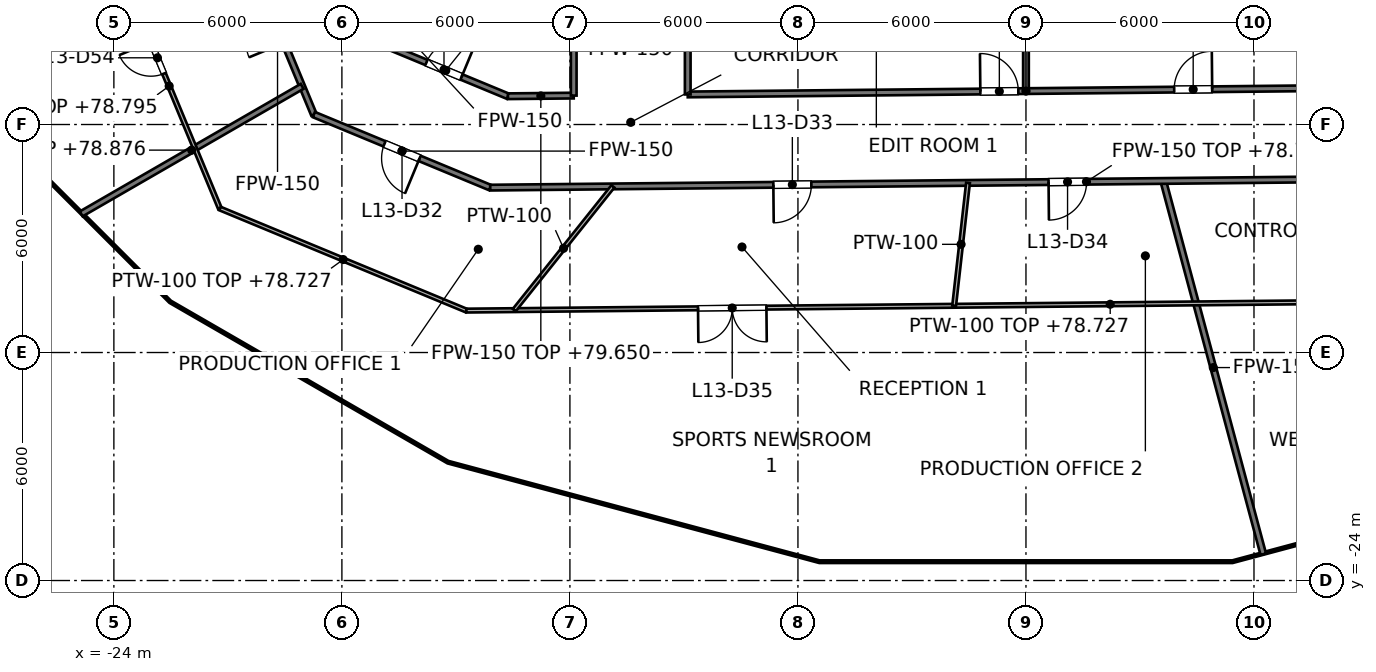
"""IFC4 building model, lengths in metres.
Left out: names, types, materials, properties, quantities, classifications, styles, units other than length and angle.
Written with IfcOpenShell. Run it as: python <this file> out.ifc"""

import sys

from ifc_helpers import new_model, si_unit, direction, frame, frame_2d, origin, place, context, subcontext, project, spatial, rectangle, extrude, element, fill, save


model = new_model("IFC4")
c1 = context("Model", 3, precision=1e-05, world=origin(), true_north=direction((0.0, 1.0)))
c2 = subcontext(c1, "Body", "Model", "MODEL_VIEW")
j1 = project(units=[si_unit("LENGTHUNIT", "METRE"), si_unit("PLANEANGLEUNIT", "RADIAN")], contexts=[c1])
p1 = place(None, origin())
s1 = spatial("IfcSite", under=j1, at=p1, CompositionType="ELEMENT")
p2 = place(p1, origin())
s2 = spatial("IfcBuilding", under=s1, at=p2, CompositionType="ELEMENT")
p3 = place(p2, frame((0.0, 0.0, 75.6)))
s3 = spatial("IfcBuildingStorey", under=s2, at=p3, CompositionType="ELEMENT", Elevation=75.6)
p4 = place(p3, frame((3.613, -13.485, 0.0), z_axis=(0.0, 0.0, 1.0), x_axis=(0.258799691225, -0.965931011937, 0.0)))
e1 = element("IfcWall", 1, at=p4, inside=s3, PredefinedType="PARTITIONING", context=c2, shape_type="SweptSolid", body=[
    extrude(rectangle(XDim=10.168, YDim=0.15, at=frame_2d((5.084, 0.0))), origin(), (0.0, 0.0, 1.0), 3.502),
])
p5 = place(p3, frame((-20.65, -7.124, 0.0), z_axis=(0.0, 0.0, 1.0), x_axis=(0.382941772901, -0.923772482036, 0.0)))
e2 = element("IfcWall", 2, at=p5, inside=s3, PredefinedType="PARTITIONING", context=c2, shape_type="SweptSolid", body=[
    extrude(rectangle(XDim=4.994, YDim=0.15, at=frame_2d((2.497, 0.0))), origin(), (0.0, 0.0, 1.0), 3.195),
])
p6 = place(p5, frame((1.95, 0.0, 0.0)))
e3 = element("IfcOpeningElement", 3, at=p6, cuts=e2, PredefinedType="OPENING", context=c2, shape_type="SweptSolid", body=[
    extrude(rectangle(XDim=1.0, YDim=2.1, at=frame_2d((0.5, 1.05))), frame((0.0, 0.075, 0.0), z_axis=(0.0, -1.0, 0.0), x_axis=(1.0, 0.0, 0.0)), (0.0, 0.0, 1.0), 0.15),
])
p7 = place(p3, frame((-18.738, -11.738, 0.0), z_axis=(0.0, 0.0, 1.0), x_axis=(0.923848598814, -0.38275810438, 0.0)))
e4 = element("IfcWall", 4, at=p7, inside=s3, PredefinedType="PARTITIONING", context=c2, shape_type="SweptSolid", body=[
    extrude(rectangle(XDim=5.024, YDim=0.15, at=frame_2d((2.512, 0.0))), origin(), (0.0, 0.0, 1.0), 3.195),
])
p8 = place(p7, frame((2.012, 0.0, 0.0)))
e5 = element("IfcOpeningElement", 5, at=p8, cuts=e4, PredefinedType="OPENING", context=c2, shape_type="SweptSolid", body=[
    extrude(rectangle(XDim=1.0, YDim=2.1, at=frame_2d((0.5, 1.05))), frame((0.0, 0.075, 0.0), z_axis=(0.0, -1.0, 0.0), x_axis=(1.0, 0.0, 0.0)), (0.0, 0.0, 1.0), 0.15),
])
p9 = place(p3, frame((-16.901, -9.901, 0.0), z_axis=(0.0, 0.0, 1.0), x_axis=(0.923795674736, -0.382885820239, 0.0)))
e6 = element("IfcWall", 6, at=p9, inside=s3, PredefinedType="PARTITIONING", context=c2, shape_type="SweptSolid", body=[
    extrude(rectangle(XDim=3.54, YDim=0.15, at=frame_2d((1.77, 0.0))), origin(), (0.0, 0.0, 1.0), 3.195),
])
p10 = place(p9, frame((1.219, 0.0, 0.0)))
e7 = element("IfcOpeningElement", 7, at=p10, cuts=e6, PredefinedType="OPENING", context=c2, shape_type="SweptSolid", body=[
    extrude(rectangle(XDim=1.0, YDim=2.1, at=frame_2d((0.5, 1.05))), frame((0.0, 0.075, 0.0), z_axis=(0.0, -1.0, 0.0), x_axis=(1.0, 0.0, 0.0)), (0.0, 0.0, 1.0), 0.15),
])
p11 = place(p3, frame((-14.097, -13.661, 0.0), z_axis=(0.0, 0.0, 1.0), x_axis=(0.999950951425, 0.009904279054, 0.0)))
e8 = element("IfcWall", 8, at=p11, inside=s3, PredefinedType="PARTITIONING", context=c2, shape_type="SweptSolid", body=[
    extrude(rectangle(XDim=31.379, YDim=0.15, at=frame_2d((15.69, 0.0))), origin(), (0.0, 0.0, 1.0), 3.127),
])
p12 = place(p11, frame((7.45, 0.0, 0.0)))
e9 = element("IfcOpeningElement", 9, at=p12, cuts=e8, PredefinedType="OPENING", context=c2, shape_type="SweptSolid", body=[
    extrude(rectangle(XDim=1.0, YDim=2.1, at=frame_2d((0.5, 1.05))), frame((0.0, 0.075, 0.0), z_axis=(0.0, -1.0, 0.0), x_axis=(1.0, 0.0, 0.0)), (0.0, 0.0, 1.0), 0.15),
])
p13 = place(p11, frame((14.692, 0.0, 0.0)))
e10 = element("IfcOpeningElement", 10, at=p13, cuts=e8, PredefinedType="OPENING", context=c2, shape_type="SweptSolid", body=[
    extrude(rectangle(XDim=1.0, YDim=2.1, at=frame_2d((0.5, 1.05))), frame((0.0, 0.075, 0.0), z_axis=(0.0, -1.0, 0.0), x_axis=(1.0, 0.0, 0.0)), (0.0, 0.0, 1.0), 0.15),
])
p14 = place(p11, frame((24.046, 0.0, 0.0)))
e11 = element("IfcOpeningElement", 11, at=p14, cuts=e8, PredefinedType="OPENING", context=c2, shape_type="SweptSolid", body=[
    extrude(rectangle(XDim=1.0, YDim=2.1, at=frame_2d((0.5, 1.05))), frame((0.0, 0.075, 0.0), z_axis=(0.0, -1.0, 0.0), x_axis=(1.0, 0.0, 0.0)), (0.0, 0.0, 1.0), 0.15),
])
p15 = place(p3, frame((-13.631, -11.256, 0.0), z_axis=(0.0, 0.0, 1.0), x_axis=(0.999949876767, 0.010012190276, 0.0)))
e12 = element("IfcWall", 12, at=p15, inside=s3, PredefinedType="PARTITIONING", context=c2, shape_type="SweptSolid", body=[
    extrude(rectangle(XDim=1.731, YDim=0.15, at=frame_2d((0.866, 0.0))), origin(), (0.0, 0.0, 1.0), 4.05),
])
p16 = place(p3, frame((-8.9, -11.209, 0.0), z_axis=(0.0, 0.0, 1.0), x_axis=(0.999950969978, 0.009902405776, 0.0)))
e13 = element("IfcWall", 13, at=p16, inside=s3, PredefinedType="PARTITIONING", context=c2, shape_type="SweptSolid", body=[
    extrude(rectangle(XDim=17.801, YDim=0.15, at=frame_2d((8.9, 0.0))), origin(), (0.0, 0.0, 1.0), 3.127),
])
p17 = place(p16, frame((7.7, 0.0, 0.0)))
e14 = element("IfcOpeningElement", 14, at=p17, cuts=e13, PredefinedType="OPENING", context=c2, shape_type="SweptSolid", body=[
    extrude(rectangle(XDim=1.0, YDim=2.1, at=frame_2d((0.5, 1.05))), frame((0.0, 0.075, 0.0), z_axis=(0.0, -1.0, 0.0), x_axis=(1.0, 0.0, 0.0)), (0.0, 0.0, 1.0), 0.15),
])
p18 = place(p16, frame((12.801, 0.0, 0.0)))
e15 = element("IfcOpeningElement", 15, at=p18, cuts=e13, PredefinedType="OPENING", context=c2, shape_type="SweptSolid", body=[
    extrude(rectangle(XDim=1.0, YDim=2.1, at=frame_2d((0.5, 1.05))), frame((0.0, 0.075, 0.0), z_axis=(0.0, -1.0, 0.0), x_axis=(1.0, 0.0, 0.0)), (0.0, 0.0, 1.0), 0.15),
])
p19 = place(p3, frame((-24.859, -14.352, 0.0), z_axis=(0.0, 0.0, 1.0), x_axis=(0.866036584562, 0.499980633826, 0.0)))
e16 = element("IfcWall", 16, at=p19, inside=s3, PredefinedType="PARTITIONING", context=c2, shape_type="SweptSolid", body=[
    extrude(rectangle(XDim=6.712, YDim=0.15, at=frame_2d((3.356, 0.0))), origin(), (0.0, 0.0, 1.0), 3.276),
])
p20 = place(p3, frame((0.0, -11.12, 0.0), z_axis=(0.0, 0.0, 1.0), x_axis=(0.0, 1.0, 0.0)))
e17 = element("IfcWall", 17, at=p20, inside=s3, PredefinedType="PARTITIONING", context=c2, shape_type="SweptSolid", body=[
    extrude(rectangle(XDim=3.12, YDim=0.15, at=frame_2d((1.56, 0.0))), origin(), (0.0, 0.0, 1.0), 3.127),
])
p21 = place(p3, frame((-8.9, -11.209, 0.0), z_axis=(0.0, 0.0, 1.0), x_axis=(0.0, 1.0, 0.0)))
e18 = element("IfcWall", 18, at=p21, inside=s3, PredefinedType="PARTITIONING", context=c2, shape_type="SweptSolid", body=[
    extrude(rectangle(XDim=3.209, YDim=0.15, at=frame_2d((1.604, 0.0))), origin(), (0.0, 0.0, 1.0), 3.127),
])
p22 = place(p3, frame((-11.9, -11.239, 0.0), z_axis=(0.0, 0.0, 1.0), x_axis=(0.0, 1.0, 0.0)))
e19 = element("IfcWall", 19, at=p22, inside=s3, PredefinedType="PARTITIONING", context=c2, shape_type="SweptSolid", body=[
    extrude(rectangle(XDim=3.239, YDim=0.15, at=frame_2d((1.62, 0.0))), origin(), (0.0, 0.0, 1.0), 3.195),
])
p23 = place(p3, frame((-23.88, -7.767, 0.0), z_axis=(0.0, 0.0, 1.0), x_axis=(0.382859836194, -0.923806443921, 0.0)))
e20 = element("IfcWall", 20, at=p23, inside=s3, PredefinedType="PARTITIONING", context=c2, shape_type="SweptSolid", body=[
    extrude(rectangle(XDim=6.974, YDim=0.1, at=frame_2d((3.487, 0.0))), origin(), (0.0, 0.0, 1.0), 3.195),
])
p24 = place(p23, frame((2.232, 0.0, 0.0)))
e21 = element("IfcOpeningElement", 21, at=p24, cuts=e20, PredefinedType="OPENING", context=c2, shape_type="SweptSolid", body=[
    extrude(rectangle(XDim=0.9, YDim=2.1, at=frame_2d((0.45, 1.05))), frame((0.0, 0.05, 0.0), z_axis=(0.0, -1.0, 0.0), x_axis=(1.0, 0.0, 0.0)), (0.0, 0.0, 1.0), 0.1),
])
p25 = place(p3, frame((-21.21, -14.21, 0.0), z_axis=(0.0, 0.0, 1.0), x_axis=(0.923854909606, -0.382742871909, 0.0)))
e22 = element("IfcWall", 22, at=p25, inside=s3, PredefinedType="PARTITIONING", context=c2, shape_type="SweptSolid", body=[
    extrude(rectangle(XDim=7.021, YDim=0.1, at=frame_2d((3.51, 0.0))), origin(), (0.0, 0.0, 1.0), 3.127),
])
p26 = place(p3, frame((-14.724, -16.897, 0.0), z_axis=(0.0, 0.0, 1.0), x_axis=(0.999951488976, 0.00984985758, 0.0)))
e23 = element("IfcWall", 23, at=p26, inside=s3, PredefinedType="PARTITIONING", context=c2, shape_type="SweptSolid", body=[
    extrude(rectangle(XDim=33.883, YDim=0.1, at=frame_2d((16.941, 0.0))), origin(), (0.0, 0.0, 1.0), 3.127),
])
p27 = place(p26, frame((6.095, 0.0, 0.0)))
e24 = element("IfcOpeningElement", 24, at=p27, cuts=e23, PredefinedType="OPENING", context=c2, shape_type="SweptSolid", body=[
    extrude(rectangle(XDim=1.8, YDim=2.1, at=frame_2d((0.9, 1.05))), frame((0.0, 0.05, 0.0), z_axis=(0.0, -1.0, 0.0), x_axis=(1.0, 0.0, 0.0)), (0.0, 0.0, 1.0), 0.1),
])
p28 = place(p26, frame((26.041, 0.0, 0.0)))
e25 = element("IfcOpeningElement", 25, at=p28, cuts=e23, PredefinedType="OPENING", context=c2, shape_type="SweptSolid", body=[
    extrude(rectangle(XDim=0.9, YDim=2.1, at=frame_2d((0.45, 1.05))), frame((0.0, 0.05, 0.0), z_axis=(0.0, -1.0, 0.0), x_axis=(1.0, 0.0, 0.0)), (0.0, 0.0, 1.0), 0.1),
])
p29 = place(p3, frame((-13.465, -16.885, 0.0), z_axis=(0.0, 0.0, 1.0), x_axis=(0.62342161962, 0.781885851126, 0.0)))
e26 = element("IfcWall", 26, at=p29, inside=s3, PredefinedType="PARTITIONING", context=c2, shape_type="SweptSolid", body=[
    extrude(rectangle(XDim=4.164, YDim=0.1, at=frame_2d((2.082, 0.0))), origin(), (0.0, 0.0, 1.0), 4.05),
])
p30 = place(p3, frame((-1.89, -16.77, 0.0), z_axis=(0.0, 0.0, 1.0), x_axis=(0.112143845044, 0.993691983473, 0.0)))
e27 = element("IfcWall", 27, at=p30, inside=s3, PredefinedType="PARTITIONING", context=c2, shape_type="SweptSolid", body=[
    extrude(rectangle(XDim=3.255, YDim=0.1, at=frame_2d((1.627, 0.0))), origin(), (0.0, 0.0, 1.0), 4.05),
])
p31 = place(p17, origin())
e28 = element("IfcDoor", 28, at=p31, inside=s3, OperationType="SINGLE_SWING_LEFT", PredefinedType="DOOR", context=c2, shape_type="SweptSolid", body=[
    extrude(rectangle(XDim=1.0, YDim=2.1, at=frame_2d((0.5, 1.05))), frame((0.0, 0.025, 0.0), z_axis=(0.0, -1.0, 0.0), x_axis=(1.0, 0.0, 0.0)), (0.0, 0.0, 1.0), 0.05),
])
fill(e14, e28)
p32 = place(p18, origin())
e29 = element("IfcDoor", 29, at=p32, inside=s3, OperationType="SINGLE_SWING_RIGHT", PredefinedType="DOOR", context=c2, shape_type="SweptSolid", body=[
    extrude(rectangle(XDim=1.0, YDim=2.1, at=frame_2d((0.5, 1.05))), frame((0.0, 0.025, 0.0), z_axis=(0.0, -1.0, 0.0), x_axis=(1.0, 0.0, 0.0)), (0.0, 0.0, 1.0), 0.05),
])
fill(e15, e29)
p33 = place(p10, origin())
e30 = element("IfcDoor", 30, at=p33, inside=s3, OperationType="SINGLE_SWING_RIGHT", PredefinedType="DOOR", context=c2, shape_type="SweptSolid", body=[
    extrude(rectangle(XDim=1.0, YDim=2.1, at=frame_2d((0.5, 1.05))), frame((0.0, 0.025, 0.0), z_axis=(0.0, -1.0, 0.0), x_axis=(1.0, 0.0, 0.0)), (0.0, 0.0, 1.0), 0.05),
])
fill(e7, e30)
p34 = place(p8, origin())
e31 = element("IfcDoor", 31, at=p34, inside=s3, OperationType="SINGLE_SWING_RIGHT", PredefinedType="DOOR", context=c2, shape_type="SweptSolid", body=[
    extrude(rectangle(XDim=1.0, YDim=2.1, at=frame_2d((0.5, 1.05))), frame((0.0, 0.025, 0.0), z_axis=(0.0, -1.0, 0.0), x_axis=(1.0, 0.0, 0.0)), (0.0, 0.0, 1.0), 0.05),
])
fill(e5, e31)
p35 = place(p12, origin())
e32 = element("IfcDoor", 32, at=p35, inside=s3, OperationType="SINGLE_SWING_LEFT", PredefinedType="DOOR", context=c2, shape_type="SweptSolid", body=[
    extrude(rectangle(XDim=1.0, YDim=2.1, at=frame_2d((0.5, 1.05))), frame((0.0, 0.025, 0.0), z_axis=(0.0, -1.0, 0.0), x_axis=(1.0, 0.0, 0.0)), (0.0, 0.0, 1.0), 0.05),
])
fill(e9, e32)
p36 = place(p13, origin())
e33 = element("IfcDoor", 33, at=p36, inside=s3, OperationType="SINGLE_SWING_LEFT", PredefinedType="DOOR", context=c2, shape_type="SweptSolid", body=[
    extrude(rectangle(XDim=1.0, YDim=2.1, at=frame_2d((0.5, 1.05))), frame((0.0, 0.025, 0.0), z_axis=(0.0, -1.0, 0.0), x_axis=(1.0, 0.0, 0.0)), (0.0, 0.0, 1.0), 0.05),
])
fill(e10, e33)
p37 = place(p27, origin())
e34 = element("IfcDoor", 34, at=p37, inside=s3, OperationType="DOUBLE_DOOR_SINGLE_SWING", PredefinedType="DOOR", context=c2, shape_type="SweptSolid", body=[
    extrude(rectangle(XDim=1.8, YDim=2.1, at=frame_2d((0.9, 1.05))), frame((0.0, 0.025, 0.0), z_axis=(0.0, -1.0, 0.0), x_axis=(1.0, 0.0, 0.0)), (0.0, 0.0, 1.0), 0.05),
])
fill(e24, e34)
p38 = place(p24, origin())
e35 = element("IfcDoor", 35, at=p38, inside=s3, OperationType="SINGLE_SWING_LEFT", PredefinedType="DOOR", context=c2, shape_type="SweptSolid", body=[
    extrude(rectangle(XDim=0.9, YDim=2.1, at=frame_2d((0.45, 1.05))), frame((0.0, 0.025, 0.0), z_axis=(0.0, -1.0, 0.0), x_axis=(1.0, 0.0, 0.0)), (0.0, 0.0, 1.0), 0.05),
])
fill(e21, e35)
save(model, sys.argv[1])
